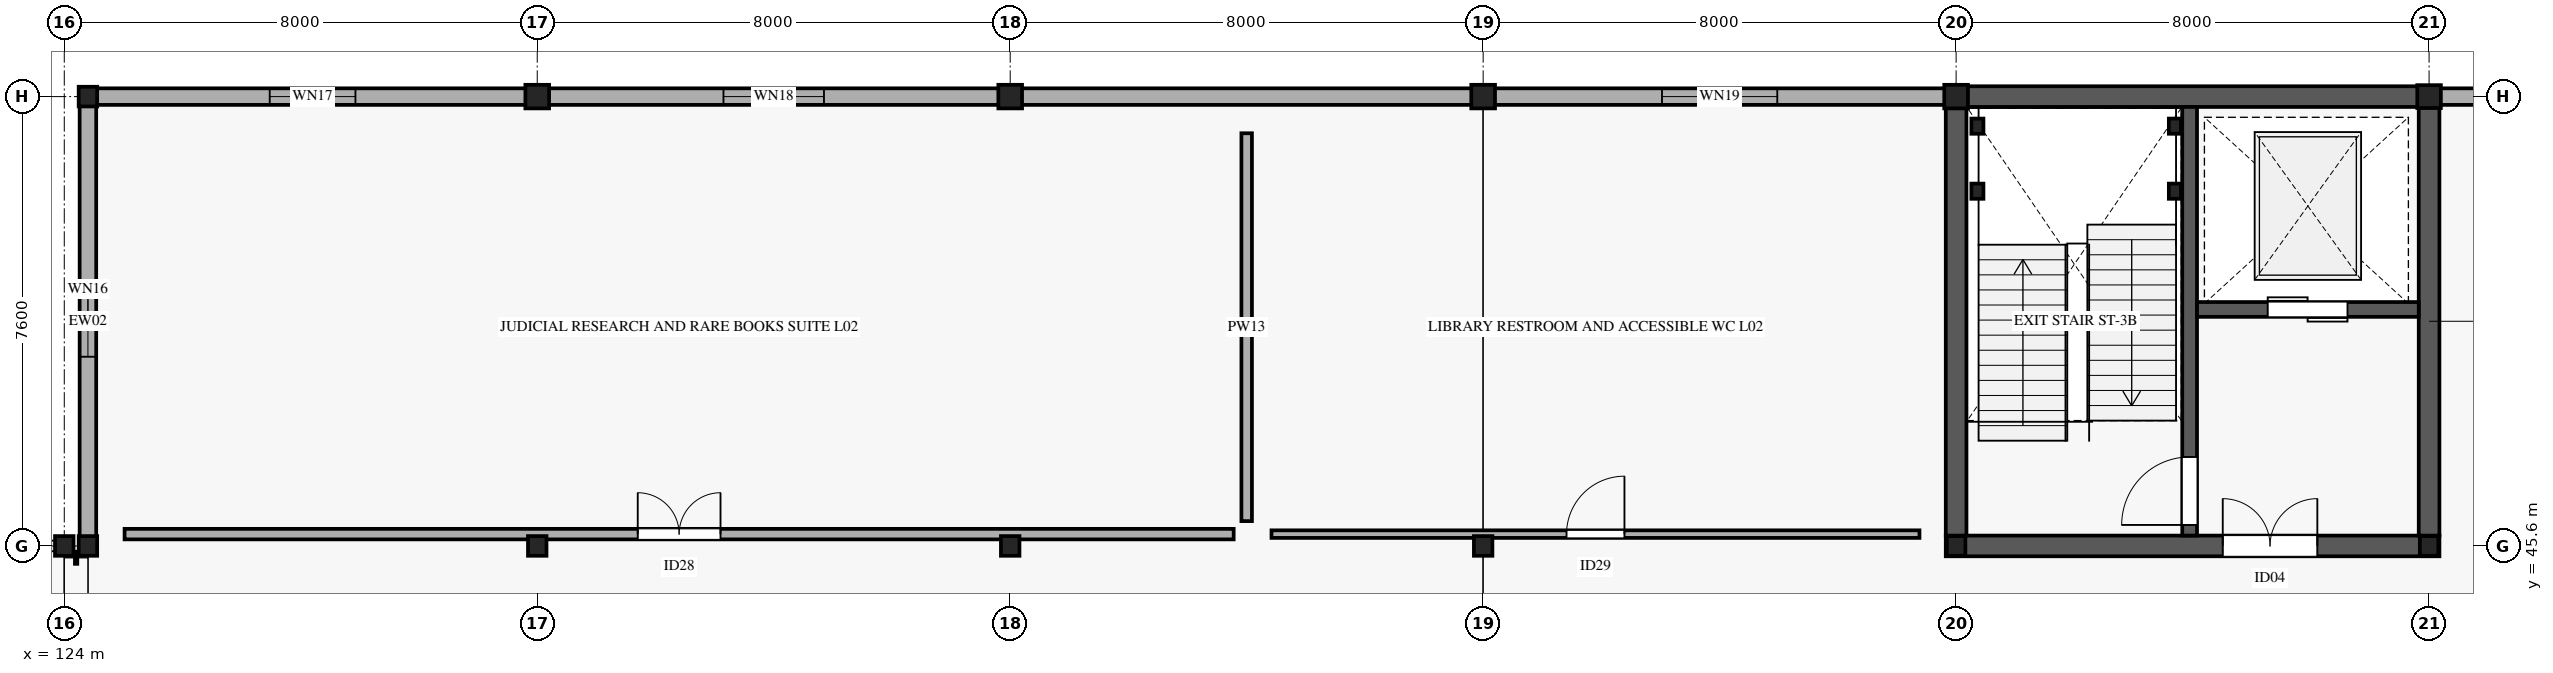
"""IFC4 building model, lengths in metres.
Left out: names, types, materials, properties, quantities, classifications, styles, units other than length and angle.
Written with IfcOpenShell. Run it as: python <this file> out.ifc"""

import sys

from ifc_helpers import new_model, si_unit, direction, frame, frame_2d, origin, origin_2d, place, context, subcontext, project, spatial, rectangle, i_section, extrude, element, fill, save


model = new_model("IFC4")
c1 = context("Model", 3, precision=1e-05, world=origin(), true_north=direction((0.0, 1.0)))
c2 = subcontext(c1, "Body", "Model", "MODEL_VIEW")
j1 = project(units=[si_unit("LENGTHUNIT", "METRE"), si_unit("PLANEANGLEUNIT", "RADIAN")], contexts=[c1])
p1 = place(None, origin())
s1 = spatial("IfcSite", under=j1, at=p1, CompositionType="ELEMENT")
p2 = place(p1, origin())
s2 = spatial("IfcBuilding", under=s1, at=p2, CompositionType="ELEMENT")
p3 = place(p2, frame((0.0, 0.0, 10.8)))
s3 = spatial("IfcBuildingStorey", under=s2, at=p3, CompositionType="ELEMENT", Elevation=10.8)
for number, where, z_axis, x_axis in (
    (1, (124.4, 45.6, 0.0), (0.0, 0.0, 1.0), (1.0, 0.0, 0.0)),
    (2, (124.4, 53.2, 0.0), (0.0, 0.0, 1.0), (1.0, 0.0, 0.0)),
    (3, (132.0, 45.6, 0.0), (0.0, 0.0, 1.0), (1.0, 0.0, 0.0)),
):
    element("IfcColumn", number, at=place(p3, frame(where, z_axis=z_axis, x_axis=x_axis)), inside=s3, PredefinedType="COLUMN", context=c2, shape_type="SweptSolid", body=[
        extrude(i_section(OverallWidth=0.313, OverallDepth=0.333, WebThickness=0.018, FlangeThickness=0.028, FilletRadius=0.015, at=origin_2d()), origin(), (0.0, 0.0, 1.0), 4.59),
    ])
p4 = place(p3, frame((132.0, 53.2, 0.0), z_axis=(0.0, 0.0, 1.0), x_axis=(1.0, 0.0, 0.0)))
e4 = element("IfcColumn", 4, at=p4, inside=s3, PredefinedType="COLUMN", context=c2, shape_type="SweptSolid", body=[
    extrude(i_section(OverallWidth=0.401, OverallDepth=0.399, WebThickness=0.025, FlangeThickness=0.04, FilletRadius=0.015, at=origin_2d()), origin(), (0.0, 0.0, 1.0), 4.59),
])
p5 = place(p3, frame((140.0, 45.6, 0.0), z_axis=(0.0, 0.0, 1.0), x_axis=(1.0, 0.0, 0.0)))
e5 = element("IfcColumn", 5, at=p5, inside=s3, PredefinedType="COLUMN", context=c2, shape_type="SweptSolid", body=[
    extrude(i_section(OverallWidth=0.313, OverallDepth=0.333, WebThickness=0.018, FlangeThickness=0.028, FilletRadius=0.015, at=origin_2d()), origin(), (0.0, 0.0, 1.0), 4.59),
])
p6 = place(p3, frame((140.0, 53.2, 0.0), z_axis=(0.0, 0.0, 1.0), x_axis=(1.0, 0.0, 0.0)))
e6 = element("IfcColumn", 6, at=p6, inside=s3, PredefinedType="COLUMN", context=c2, shape_type="SweptSolid", body=[
    extrude(i_section(OverallWidth=0.401, OverallDepth=0.399, WebThickness=0.025, FlangeThickness=0.04, FilletRadius=0.015, at=origin_2d()), origin(), (0.0, 0.0, 1.0), 4.59),
])
p7 = place(p3, frame((148.0, 45.6, 0.0), z_axis=(0.0, 0.0, 1.0), x_axis=(1.0, 0.0, 0.0)))
e7 = element("IfcColumn", 7, at=p7, inside=s3, PredefinedType="COLUMN", context=c2, shape_type="SweptSolid", body=[
    extrude(i_section(OverallWidth=0.313, OverallDepth=0.333, WebThickness=0.018, FlangeThickness=0.028, FilletRadius=0.015, at=origin_2d()), origin(), (0.0, 0.0, 1.0), 4.59),
])
p8 = place(p3, frame((148.0, 53.2, 0.0), z_axis=(0.0, 0.0, 1.0), x_axis=(1.0, 0.0, 0.0)))
e8 = element("IfcColumn", 8, at=p8, inside=s3, PredefinedType="COLUMN", context=c2, shape_type="SweptSolid", body=[
    extrude(i_section(OverallWidth=0.401, OverallDepth=0.399, WebThickness=0.025, FlangeThickness=0.04, FilletRadius=0.015, at=origin_2d()), origin(), (0.0, 0.0, 1.0), 4.59),
])
p9 = place(p3, frame((156.0, 45.6, 0.0), z_axis=(0.0, 0.0, 1.0), x_axis=(1.0, 0.0, 0.0)))
e9 = element("IfcColumn", 9, at=p9, inside=s3, PredefinedType="COLUMN", context=c2, shape_type="SweptSolid", body=[
    extrude(i_section(OverallWidth=0.313, OverallDepth=0.333, WebThickness=0.018, FlangeThickness=0.028, FilletRadius=0.015, at=origin_2d()), origin(), (0.0, 0.0, 1.0), 4.59),
])
p10 = place(p3, frame((156.0, 53.2, 0.0), z_axis=(0.0, 0.0, 1.0), x_axis=(1.0, 0.0, 0.0)))
e10 = element("IfcColumn", 10, at=p10, inside=s3, PredefinedType="COLUMN", context=c2, shape_type="SweptSolid", body=[
    extrude(i_section(OverallWidth=0.401, OverallDepth=0.399, WebThickness=0.025, FlangeThickness=0.04, FilletRadius=0.015, at=origin_2d()), origin(), (0.0, 0.0, 1.0), 4.59),
])
p11 = place(p3, frame((164.0, 45.6, 0.0), z_axis=(0.0, 0.0, 1.0), x_axis=(1.0, 0.0, 0.0)))
e11 = element("IfcColumn", 11, at=p11, inside=s3, PredefinedType="COLUMN", context=c2, shape_type="SweptSolid", body=[
    extrude(i_section(OverallWidth=0.313, OverallDepth=0.333, WebThickness=0.018, FlangeThickness=0.028, FilletRadius=0.015, at=origin_2d()), origin(), (0.0, 0.0, 1.0), 4.59),
])
p12 = place(p3, frame((164.0, 53.2, 0.0), z_axis=(0.0, 0.0, 1.0), x_axis=(1.0, 0.0, 0.0)))
e12 = element("IfcColumn", 12, at=p12, inside=s3, PredefinedType="COLUMN", context=c2, shape_type="SweptSolid", body=[
    extrude(i_section(OverallWidth=0.399, OverallDepth=0.387, WebThickness=0.021, FlangeThickness=0.033, FilletRadius=0.015, at=origin_2d()), origin(), (0.0, 0.0, 1.0), 4.59),
])
p13 = place(p3, frame((124.0, 45.6, 0.0), z_axis=(0.0, 0.0, 1.0), x_axis=(1.0, 0.0, 0.0)))
e13 = element("IfcColumn", 13, at=p13, inside=s3, PredefinedType="COLUMN", context=c2, shape_type="SweptSolid", body=[
    extrude(i_section(OverallWidth=0.313, OverallDepth=0.333, WebThickness=0.018, FlangeThickness=0.028, FilletRadius=0.015, at=origin_2d()), origin(), (0.0, 0.0, 1.0), 4.59),
])
p14 = place(p3, frame((124.4, 45.58, 0.0), z_axis=(0.0, 0.0, 1.0), x_axis=(0.0, 1.0, 0.0)))
e14 = element("IfcWall", 14, at=p14, inside=s3, PredefinedType="STANDARD", context=c2, shape_type="SweptSolid", body=[
    extrude(rectangle(XDim=7.64, YDim=0.28, at=frame_2d((3.82, 0.0))), origin(), (0.0, 0.0, 1.0), 3.66),
])
p15 = place(p14, frame((3.22, 0.0, 0.75)))
e15 = element("IfcOpeningElement", 15, at=p15, cuts=e14, PredefinedType="OPENING", context=c2, shape_type="SweptSolid", body=[
    extrude(rectangle(XDim=1.2, YDim=1.8, at=frame_2d((0.6, 0.9))), frame((0.0, 0.15, 0.0), z_axis=(0.0, -1.0, 0.0), x_axis=(1.0, 0.0, 0.0)), (0.0, 0.0, 1.0), 0.3),
])
p16 = place(p3, frame((124.38, 53.2, 0.0), z_axis=(0.0, 0.0, 1.0), x_axis=(1.0, 0.0, 0.0)))
e16 = element("IfcWall", 16, at=p16, inside=s3, PredefinedType="STANDARD", context=c2, shape_type="SweptSolid", body=[
    extrude(rectangle(XDim=7.64, YDim=0.28, at=frame_2d((3.82, 0.0))), origin(), (0.0, 0.0, 1.0), 3.66),
])
p17 = place(p16, frame((3.095, 0.0, 0.75)))
e17 = element("IfcOpeningElement", 17, at=p17, cuts=e16, PredefinedType="OPENING", context=c2, shape_type="SweptSolid", body=[
    extrude(rectangle(XDim=1.45, YDim=1.8, at=frame_2d((0.725, 0.9))), frame((0.0, 0.15, 0.0), z_axis=(0.0, -1.0, 0.0), x_axis=(1.0, 0.0, 0.0)), (0.0, 0.0, 1.0), 0.3),
])
p18 = place(p3, frame((131.98, 53.2, 0.0), z_axis=(0.0, 0.0, 1.0), x_axis=(1.0, 0.0, 0.0)))
e18 = element("IfcWall", 18, at=p18, inside=s3, PredefinedType="STANDARD", context=c2, shape_type="SweptSolid", body=[
    extrude(rectangle(XDim=8.04, YDim=0.28, at=frame_2d((4.02, 0.0))), origin(), (0.0, 0.0, 1.0), 3.66),
])
p19 = place(p18, frame((3.17, 0.0, 0.75)))
e19 = element("IfcOpeningElement", 19, at=p19, cuts=e18, PredefinedType="OPENING", context=c2, shape_type="SweptSolid", body=[
    extrude(rectangle(XDim=1.7, YDim=1.8, at=frame_2d((0.85, 0.9))), frame((0.0, 0.15, 0.0), z_axis=(0.0, -1.0, 0.0), x_axis=(1.0, 0.0, 0.0)), (0.0, 0.0, 1.0), 0.3),
])
p20 = place(p3, frame((139.98, 53.2, 0.0), z_axis=(0.0, 0.0, 1.0), x_axis=(1.0, 0.0, 0.0)))
e20 = element("IfcWall", 20, at=p20, inside=s3, PredefinedType="STANDARD", context=c2, shape_type="SweptSolid", body=[
    extrude(rectangle(XDim=8.04, YDim=0.28, at=frame_2d((4.02, 0.0))), origin(), (0.0, 0.0, 1.0), 3.66),
])
p21 = place(p3, frame((147.98, 53.2, 0.0), z_axis=(0.0, 0.0, 1.0), x_axis=(1.0, 0.0, 0.0)))
e21 = element("IfcWall", 21, at=p21, inside=s3, PredefinedType="STANDARD", context=c2, shape_type="SweptSolid", body=[
    extrude(rectangle(XDim=8.04, YDim=0.28, at=frame_2d((4.02, 0.0))), origin(), (0.0, 0.0, 1.0), 3.66),
])
p22 = place(p21, frame((3.045, 0.0, 0.75)))
e22 = element("IfcOpeningElement", 22, at=p22, cuts=e21, PredefinedType="OPENING", context=c2, shape_type="SweptSolid", body=[
    extrude(rectangle(XDim=1.95, YDim=1.8, at=frame_2d((0.975, 0.9))), frame((0.0, 0.15, 0.0), z_axis=(0.0, -1.0, 0.0), x_axis=(1.0, 0.0, 0.0)), (0.0, 0.0, 1.0), 0.3),
])
p23 = place(p3, frame((163.98, 53.2, 0.0), z_axis=(0.0, 0.0, 1.0), x_axis=(1.0, 0.0, 0.0)))
e23 = element("IfcWall", 23, at=p23, inside=s3, PredefinedType="STANDARD", context=c2, shape_type="SweptSolid", body=[
    extrude(rectangle(XDim=8.04, YDim=0.28, at=frame_2d((4.02, 0.0))), origin(), (0.0, 0.0, 1.0), 3.66),
])
p24 = place(p23, frame((2.87, 0.0, 0.75)))
e24 = element("IfcOpeningElement", 24, at=p24, cuts=e23, PredefinedType="OPENING", context=c2, shape_type="SweptSolid", body=[
    extrude(rectangle(XDim=2.3, YDim=1.8, at=frame_2d((1.15, 0.9))), frame((0.0, 0.15, 0.0), z_axis=(0.0, -1.0, 0.0), x_axis=(1.0, 0.0, 0.0)), (0.0, 0.0, 1.0), 0.3),
])
p25 = place(p3, frame((124.18, 45.4, 0.0), z_axis=(0.0, 0.0, 1.0), x_axis=(1.0, 0.0, 0.0)))
e25 = element("IfcWall", 25, at=p25, inside=s3, PredefinedType="STANDARD", context=c2, shape_type="SweptSolid", body=[
    extrude(rectangle(XDim=0.04, YDim=0.205, at=frame_2d((0.02, 0.0))), origin(), (0.0, 0.0, 1.0), 4.02),
])
p26 = place(p3, frame((155.825, 45.6, 0.0), z_axis=(0.0, 0.0, 1.0), x_axis=(1.0, 0.0, 0.0)))
e26 = element("IfcWall", 26, at=p26, inside=s3, PredefinedType="SHEAR", context=c2, shape_type="SweptSolid", body=[
    extrude(rectangle(XDim=8.35, YDim=0.35, at=frame_2d((4.175, 0.0))), origin(), (0.0, 0.0, 1.0), 4.59),
])
p27 = place(p26, frame((4.685, 0.0, 0.0)))
e27 = element("IfcOpeningElement", 27, at=p27, cuts=e26, PredefinedType="OPENING", context=c2, shape_type="SweptSolid", body=[
    extrude(rectangle(XDim=1.6, YDim=2.35, at=frame_2d((0.8, 1.175))), frame((0.0, 0.185, 0.0), z_axis=(0.0, -1.0, 0.0), x_axis=(1.0, 0.0, 0.0)), (0.0, 0.0, 1.0), 0.37),
])
p28 = place(p3, frame((155.825, 53.2, 0.0), z_axis=(0.0, 0.0, 1.0), x_axis=(1.0, 0.0, 0.0)))
e28 = element("IfcWall", 28, at=p28, inside=s3, PredefinedType="SHEAR", context=c2, shape_type="SweptSolid", body=[
    extrude(rectangle(XDim=8.35, YDim=0.35, at=frame_2d((4.175, 0.0))), origin(), (0.0, 0.0, 1.0), 4.59),
])
for number, where, z_axis, x_axis in (
    (29, (156.0, 45.775, 0.0), (0.0, 0.0, 1.0), (0.0, 1.0, 0.0)),
    (30, (164.0, 45.775, 0.0), (0.0, 0.0, 1.0), (0.0, 1.0, 0.0)),
):
    element("IfcWall", number, at=place(p3, frame(where, z_axis=z_axis, x_axis=x_axis)), inside=s3, PredefinedType="SHEAR", context=c2, shape_type="SweptSolid", body=[
        extrude(rectangle(XDim=7.25, YDim=0.35, at=frame_2d((3.625, 0.0))), origin(), (0.0, 0.0, 1.0), 4.59),
    ])
p29 = place(p3, frame((159.95, 45.775, 0.0), z_axis=(0.0, 0.0, 1.0), x_axis=(0.0, 1.0, 0.0)))
e31 = element("IfcWall", 31, at=p29, inside=s3, PredefinedType="SHEAR", context=c2, shape_type="SweptSolid", body=[
    extrude(rectangle(XDim=7.25, YDim=0.25, at=frame_2d((3.625, 0.0))), origin(), (0.0, 0.0, 1.0), 4.59),
])
p30 = place(p29, frame((0.18, 0.0, 0.0)))
e32 = element("IfcOpeningElement", 32, at=p30, cuts=e31, PredefinedType="OPENING", context=c2, shape_type="SweptSolid", body=[
    extrude(rectangle(XDim=1.15, YDim=2.2, at=frame_2d((0.575, 1.1))), frame((0.0, 0.135, 0.0), z_axis=(0.0, -1.0, 0.0), x_axis=(1.0, 0.0, 0.0)), (0.0, 0.0, 1.0), 0.27),
])
p31 = place(p3, frame((160.075, 49.6, 0.0), z_axis=(0.0, 0.0, 1.0), x_axis=(1.0, 0.0, 0.0)))
e33 = element("IfcWall", 33, at=p31, inside=s3, PredefinedType="SHEAR", context=c2, shape_type="SweptSolid", body=[
    extrude(rectangle(XDim=3.75, YDim=0.25, at=frame_2d((1.875, 0.0))), origin(), (0.0, 0.0, 1.0), 4.59),
])
p32 = place(p31, frame((1.195, 0.0, 0.0)))
e34 = element("IfcOpeningElement", 34, at=p32, cuts=e33, PredefinedType="OPENING", context=c2, shape_type="SweptSolid", body=[
    extrude(rectangle(XDim=1.35, YDim=2.2, at=frame_2d((0.675, 1.1))), frame((0.0, 0.135, 0.0), z_axis=(0.0, -1.0, 0.0), x_axis=(1.0, 0.0, 0.0)), (0.0, 0.0, 1.0), 0.27),
])
for number, where, z_axis, x_axis in (
    (35, (156.36, 51.6, 0.0), (0.0, 0.0, 1.0), (1.0, 0.0, 0.0)),
    (36, (159.7, 51.6, 0.0), (0.0, 0.0, 1.0), (1.0, 0.0, 0.0)),
    (37, (156.36, 52.7, 0.0), (0.0, 0.0, 1.0), (1.0, 0.0, 0.0)),
    (38, (159.7, 52.7, 0.0), (0.0, 0.0, 1.0), (1.0, 0.0, 0.0)),
):
    element("IfcColumn", number, at=place(p3, frame(where, z_axis=z_axis, x_axis=x_axis)), inside=s3, PredefinedType="COLUMN", context=c2, shape_type="SweptSolid", body=[
        extrude(i_section(OverallWidth=0.204, OverallDepth=0.257, WebThickness=0.009, FlangeThickness=0.016, FilletRadius=0.013, at=origin_2d()), origin(), (0.0, 0.0, 1.0), 4.795),
    ])
p33 = place(p3, frame((125.02, 45.8, 0.0), z_axis=(0.0, 0.0, 1.0), x_axis=(1.0, 0.0, 0.0)))
e39 = element("IfcWall", 39, at=p33, inside=s3, PredefinedType="PARTITIONING", context=c2, shape_type="SweptSolid", body=[
    extrude(rectangle(XDim=18.76, YDim=0.178, at=frame_2d((9.38, 0.0))), origin(), (0.0, 0.0, 1.0), 3.45),
])
p34 = place(p33, frame((8.68, 0.0, 0.0)))
e40 = element("IfcOpeningElement", 40, at=p34, cuts=e39, PredefinedType="OPENING", context=c2, shape_type="SweptSolid", body=[
    extrude(rectangle(XDim=1.4, YDim=2.3, at=frame_2d((0.7, 1.15))), frame((0.0, 0.099, 0.0), z_axis=(0.0, -1.0, 0.0), x_axis=(1.0, 0.0, 0.0)), (0.0, 0.0, 1.0), 0.198),
])
p35 = place(p3, frame((144.0, 46.02, 0.0), z_axis=(0.0, 0.0, 1.0), x_axis=(0.0, 1.0, 0.0)))
e41 = element("IfcWall", 41, at=p35, inside=s3, PredefinedType="PARTITIONING", context=c2, shape_type="SweptSolid", body=[
    extrude(rectangle(XDim=6.56, YDim=0.178, at=frame_2d((3.28, 0.0))), origin(), (0.0, 0.0, 1.0), 3.45),
])
p36 = place(p3, frame((144.42, 45.8, 0.0), z_axis=(0.0, 0.0, 1.0), x_axis=(1.0, 0.0, 0.0)))
e42 = element("IfcWall", 42, at=p36, inside=s3, PredefinedType="PARTITIONING", context=c2, shape_type="SweptSolid", body=[
    extrude(rectangle(XDim=10.96, YDim=0.128, at=frame_2d((5.48, 0.0))), origin(), (0.0, 0.0, 1.0), 3.45),
])
p37 = place(p36, frame((4.99, 0.0, 0.0)))
e43 = element("IfcOpeningElement", 43, at=p37, cuts=e42, PredefinedType="OPENING", context=c2, shape_type="SweptSolid", body=[
    extrude(rectangle(XDim=0.98, YDim=2.25, at=frame_2d((0.49, 1.125))), frame((0.0, 0.074, 0.0), z_axis=(0.0, -1.0, 0.0), x_axis=(1.0, 0.0, 0.0)), (0.0, 0.0, 1.0), 0.148),
])
p38 = place(p15, origin())
e44 = element("IfcWindow", 44, at=p38, inside=s3, PartitioningType="SINGLE_PANEL", PredefinedType="WINDOW", context=c2, shape_type="SweptSolid", body=[
    extrude(rectangle(XDim=1.2, YDim=1.8, at=frame_2d((0.6, 0.9))), frame((0.0, 0.03, 0.0), z_axis=(0.0, -1.0, 0.0), x_axis=(1.0, 0.0, 0.0)), (0.0, 0.0, 1.0), 0.06),
])
fill(e15, e44)
p39 = place(p17, origin())
e45 = element("IfcWindow", 45, at=p39, inside=s3, PartitioningType="SINGLE_PANEL", PredefinedType="WINDOW", context=c2, shape_type="SweptSolid", body=[
    extrude(rectangle(XDim=1.45, YDim=1.8, at=frame_2d((0.725, 0.9))), frame((0.0, 0.03, 0.0), z_axis=(0.0, -1.0, 0.0), x_axis=(1.0, 0.0, 0.0)), (0.0, 0.0, 1.0), 0.06),
])
fill(e17, e45)
p40 = place(p19, origin())
e46 = element("IfcWindow", 46, at=p40, inside=s3, PartitioningType="SINGLE_PANEL", PredefinedType="WINDOW", context=c2, shape_type="SweptSolid", body=[
    extrude(rectangle(XDim=1.7, YDim=1.8, at=frame_2d((0.85, 0.9))), frame((0.0, 0.03, 0.0), z_axis=(0.0, -1.0, 0.0), x_axis=(1.0, 0.0, 0.0)), (0.0, 0.0, 1.0), 0.06),
])
fill(e19, e46)
p41 = place(p22, origin())
e47 = element("IfcWindow", 47, at=p41, inside=s3, PartitioningType="SINGLE_PANEL", PredefinedType="WINDOW", context=c2, shape_type="SweptSolid", body=[
    extrude(rectangle(XDim=1.95, YDim=1.8, at=frame_2d((0.975, 0.9))), frame((0.0, 0.03, 0.0), z_axis=(0.0, -1.0, 0.0), x_axis=(1.0, 0.0, 0.0)), (0.0, 0.0, 1.0), 0.06),
])
fill(e22, e47)
p42 = place(p30, origin())
e48 = element("IfcDoor", 48, at=p42, inside=s3, OperationType="SINGLE_SWING_LEFT", PredefinedType="DOOR", context=c2, shape_type="SweptSolid", body=[
    extrude(rectangle(XDim=1.15, YDim=2.2, at=frame_2d((0.575, 1.1))), frame((0.0, 0.025, 0.0), z_axis=(0.0, -1.0, 0.0), x_axis=(1.0, 0.0, 0.0)), (0.0, 0.0, 1.0), 0.05),
])
fill(e32, e48)
p43 = place(p27, origin())
e49 = element("IfcDoor", 49, at=p43, inside=s3, OperationType="DOUBLE_DOOR_SINGLE_SWING", PredefinedType="DOOR", context=c2, shape_type="SweptSolid", body=[
    extrude(rectangle(XDim=1.6, YDim=2.35, at=frame_2d((0.8, 1.175))), frame((0.0, 0.025, 0.0), z_axis=(0.0, -1.0, 0.0), x_axis=(1.0, 0.0, 0.0)), (0.0, 0.0, 1.0), 0.05),
])
fill(e27, e49)
p44 = place(p32, origin())
e50 = element("IfcDoor", 50, at=p44, inside=s3, OperationType="DOUBLE_DOOR_SLIDING", PredefinedType="DOOR", context=c2, shape_type="SweptSolid", body=[
    extrude(rectangle(XDim=1.35, YDim=2.2, at=frame_2d((0.675, 1.1))), frame((0.0, 0.025, 0.0), z_axis=(0.0, -1.0, 0.0), x_axis=(1.0, 0.0, 0.0)), (0.0, 0.0, 1.0), 0.05),
])
fill(e34, e50)
p45 = place(p34, origin())
e51 = element("IfcDoor", 51, at=p45, inside=s3, OperationType="DOUBLE_DOOR_SINGLE_SWING", PredefinedType="DOOR", context=c2, shape_type="SweptSolid", body=[
    extrude(rectangle(XDim=1.4, YDim=2.3, at=frame_2d((0.7, 1.15))), frame((0.0, 0.025, 0.0), z_axis=(0.0, -1.0, 0.0), x_axis=(1.0, 0.0, 0.0)), (0.0, 0.0, 1.0), 0.05),
])
fill(e40, e51)
p46 = place(p37, origin())
e52 = element("IfcDoor", 52, at=p46, inside=s3, OperationType="SINGLE_SWING_RIGHT", PredefinedType="DOOR", context=c2, shape_type="SweptSolid", body=[
    extrude(rectangle(XDim=0.98, YDim=2.25, at=frame_2d((0.49, 1.125))), frame((0.0, 0.025, 0.0), z_axis=(0.0, -1.0, 0.0), x_axis=(1.0, 0.0, 0.0)), (0.0, 0.0, 1.0), 0.05),
])
fill(e43, e52)
save(model, sys.argv[1])
